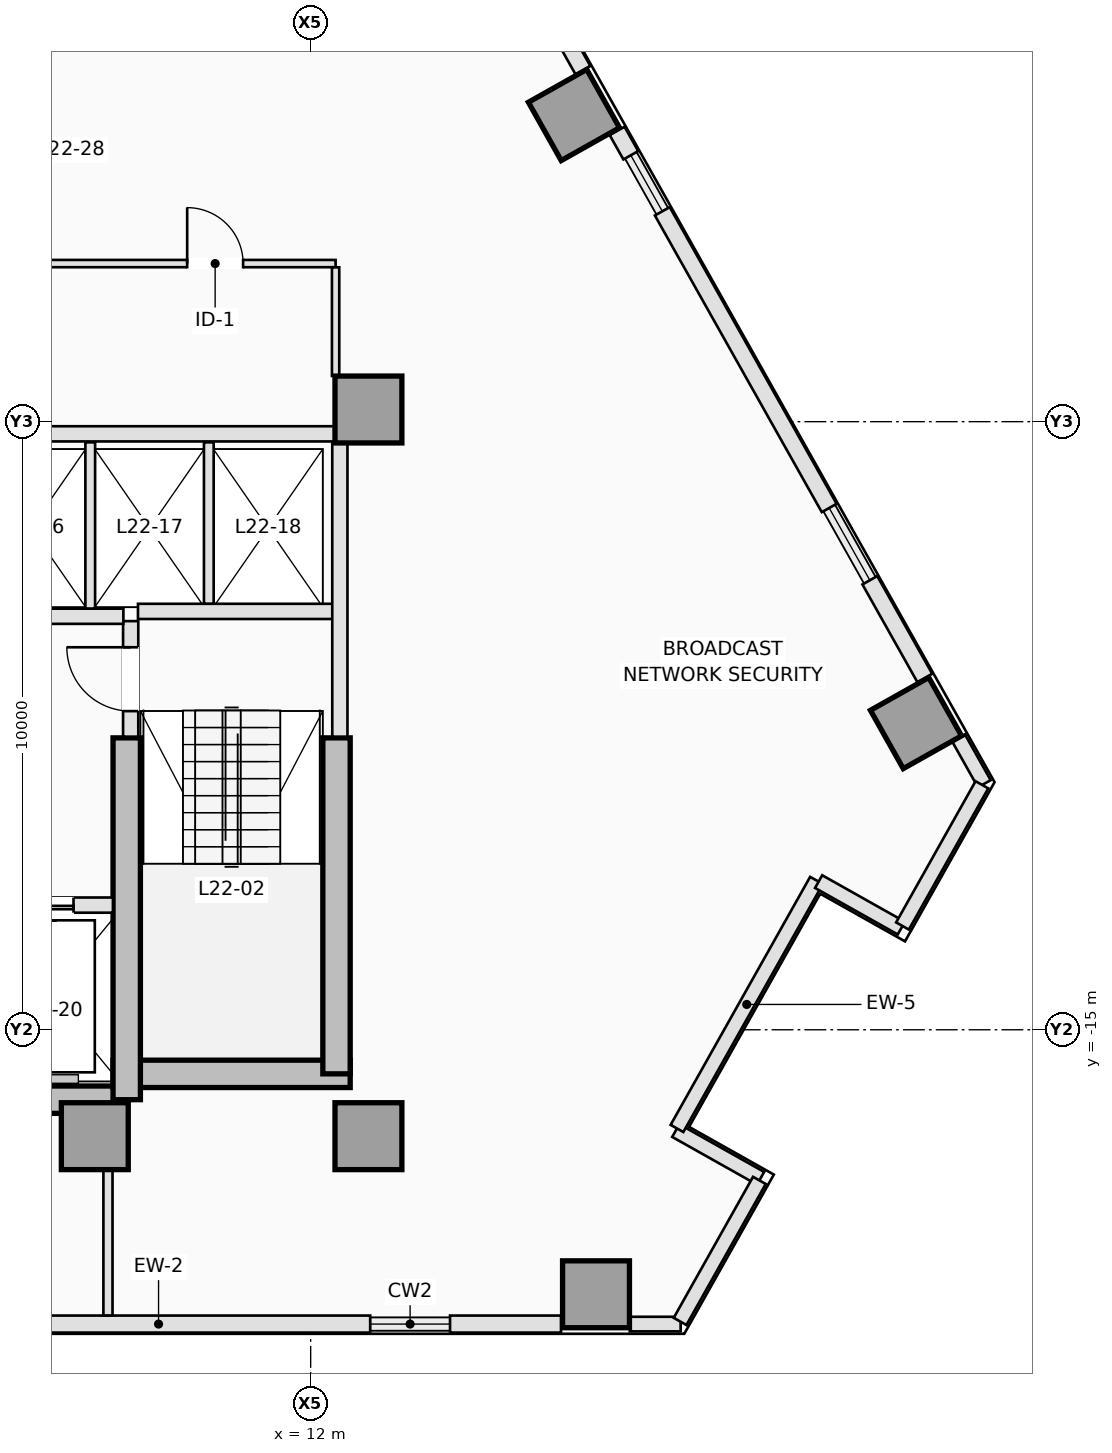
"""IFC4 building model, lengths in metres.
Left out: names, types, materials, properties, quantities, classifications, styles, units other than length and angle.
Written with IfcOpenShell. Run it as: python <this file> out.ifc"""

import sys

from ifc_helpers import new_model, si_unit, direction, frame, frame_2d, origin, origin_2d, place, context, subcontext, project, spatial, rectangle, extrude, element, fill, save


model = new_model("IFC4")
c1 = context("Model", 3, precision=1e-05, world=origin(), true_north=direction((0.0, 1.0)))
c2 = subcontext(c1, "Body", "Model", "MODEL_VIEW")
j1 = project(units=[si_unit("LENGTHUNIT", "METRE"), si_unit("PLANEANGLEUNIT", "RADIAN")], contexts=[c1])
p1 = place(None, origin())
s1 = spatial("IfcSite", under=j1, at=p1, CompositionType="ELEMENT")
p2 = place(p1, origin())
s2 = spatial("IfcBuilding", under=s1, at=p2, CompositionType="ELEMENT")
p3 = place(p2, frame((0.0, 0.0, 83.6)))
s3 = spatial("IfcBuildingStorey", under=s2, at=p3, CompositionType="ELEMENT", Elevation=83.6)
p4 = place(p3, frame((3.75, -16.15, 0.0), z_axis=(0.0, 0.0, 1.0), x_axis=(1.0, 0.0, 0.0)))
e1 = element("IfcWall", 1, at=p4, inside=s3, PredefinedType="SHEAR", context=c2, shape_type="SweptSolid", body=[
    extrude(rectangle(XDim=5.225, YDim=0.45, at=frame_2d((2.613, 0.0))), origin(), (0.0, 0.0, 1.0), 3.5),
])
p5 = place(p3, frame((8.75, -15.725, 0.0), z_axis=(0.0, 0.0, 1.0), x_axis=(1.0, 0.0, 0.0)))
e2 = element("IfcWall", 2, at=p5, inside=s3, PredefinedType="SHEAR", context=c2, shape_type="SweptSolid", body=[
    extrude(rectangle(XDim=3.9, YDim=0.45, at=frame_2d((1.95, 0.0))), origin(), (0.0, 0.0, 1.0), 3.5),
])
p6 = place(p3, frame((12.425, -15.725, 0.0), z_axis=(0.0, 0.0, 1.0), x_axis=(0.0, 1.0, 0.0)))
e3 = element("IfcWall", 3, at=p6, inside=s3, PredefinedType="SHEAR", context=c2, shape_type="SweptSolid", body=[
    extrude(rectangle(XDim=5.525, YDim=0.45, at=frame_2d((2.763, 0.0))), origin(), (0.0, 0.0, 1.0), 3.5),
])
p7 = place(p3, frame((8.975, -16.15, 0.0), z_axis=(0.0, 0.0, 1.0), x_axis=(0.0, 1.0, 0.0)))
e4 = element("IfcWall", 4, at=p7, inside=s3, PredefinedType="SHEAR", context=c2, shape_type="SweptSolid", body=[
    extrude(rectangle(XDim=5.95, YDim=0.45, at=frame_2d((2.975, 0.0))), origin(), (0.0, 0.0, 1.0), 3.5),
])
for number, where, z_axis, x_axis in (
    (5, (8.45, -16.75, 0.0), (0.0, 0.0, 1.0), (1.0, 0.0, 0.0)),
    (6, (12.95, -16.75, 0.0), (0.0, 0.0, 1.0), (1.0, 0.0, 0.0)),
    (7, (12.95, -4.8, 0.0), (0.0, 0.0, 1.0), (1.0, 0.0, 0.0)),
    (8, (16.692, -19.35, 0.0), (0.0, 0.0, 1.0), (0.0, 1.0, 0.0)),
    (9, (21.955, -9.957, 0.0), (0.0, 0.0, 1.0), (0.872, 0.49, 0.0)),
    (10, (16.33, 0.043, 0.0), (0.0, 0.0, 1.0), (0.872, 0.49, 0.0)),
):
    element("IfcColumn", number, at=place(p3, frame(where, z_axis=z_axis, x_axis=x_axis)), inside=s3, PredefinedType="COLUMN", context=c2, shape_type="SweptSolid", body=[
        extrude(rectangle(XDim=1.1, YDim=1.1, at=origin_2d()), origin(), (0.0, 0.0, 1.0), 3.5),
    ])
p8 = place(p3, frame((18.084, -19.84, 0.0), z_axis=(0.0, 0.0, 1.0), x_axis=(-1.0, 0.0, 0.0)))
e11 = element("IfcWall", 11, at=p8, inside=s3, PredefinedType="STANDARD", context=c2, shape_type="SweptSolid", body=[
    extrude(rectangle(XDim=0.836, YDim=0.24, at=frame_2d((0.418, 0.0))), origin(), (0.0, 0.0, 1.0), 3.25),
])
p9 = place(p3, frame((16.117, -19.84, 0.0), z_axis=(0.0, 0.0, 1.0), x_axis=(-1.0, 0.0, 0.0)))
e12 = element("IfcWall", 12, at=p9, inside=s3, PredefinedType="STANDARD", context=c2, shape_type="SweptSolid", body=[
    extrude(rectangle(XDim=1.826, YDim=0.28, at=frame_2d((0.913, 0.0))), origin(), (0.0, 0.0, 1.0), 3.25),
])
p10 = place(p3, frame((12.979, -19.84, 0.0), z_axis=(0.0, 0.0, 1.0), x_axis=(-1.0, 0.0, 0.0)))
e13 = element("IfcWall", 13, at=p10, inside=s3, PredefinedType="STANDARD", context=c2, shape_type="SweptSolid", body=[
    extrude(rectangle(XDim=6.96, YDim=0.28, at=frame_2d((3.48, 0.0))), origin(), (0.0, 0.0, 1.0), 3.25),
])
p11 = place(p3, frame((22.654, -10.2, 0.0), z_axis=(0.0, 0.0, 1.0), x_axis=(0.490355003566, -0.871522788272, 0.0)))
e14 = element("IfcWall", 14, at=p11, inside=s3, PredefinedType="STANDARD", context=c2, shape_type="SweptSolid", body=[
    extrude(rectangle(XDim=0.865, YDim=0.24, at=frame_2d((0.433, 0.0))), origin(), (0.0, 0.0, 1.0), 3.25),
])
p12 = place(p3, frame((17.039, -0.218, 0.0), z_axis=(0.0, 0.0, 1.0), x_axis=(0.490009165718, -0.871717280724, 0.0)))
e15 = element("IfcWall", 15, at=p12, inside=s3, PredefinedType="STANDARD", context=c2, shape_type="SweptSolid", body=[
    extrude(rectangle(XDim=0.46, YDim=0.28, at=frame_2d((0.23, 0.0))), origin(), (0.0, 0.0, 1.0), 3.25),
])
p13 = place(p3, frame((17.783, -1.541, 0.0), z_axis=(0.0, 0.0, 1.0), x_axis=(0.490265381388, -0.871573207374, 0.0)))
e16 = element("IfcWall", 16, at=p13, inside=s3, PredefinedType="STANDARD", context=c2, shape_type="SweptSolid", body=[
    extrude(rectangle(XDim=5.597, YDim=0.28, at=frame_2d((2.799, 0.0))), origin(), (0.0, 0.0, 1.0), 3.25),
])
p14 = place(p3, frame((21.196, -7.608, 0.0), z_axis=(0.0, 0.0, 1.0), x_axis=(0.490280102884, -0.871564926277, 0.0)))
e17 = element("IfcWall", 17, at=p14, inside=s3, PredefinedType="STANDARD", context=c2, shape_type="SweptSolid", body=[
    extrude(rectangle(XDim=1.844, YDim=0.28, at=frame_2d((0.922, 0.0))), origin(), (0.0, 0.0, 1.0), 3.25),
])
p15 = place(p3, frame((14.37, 4.527, 0.0), z_axis=(0.0, 0.0, 1.0), x_axis=(0.490293592365, -0.871557337922, 0.0)))
e18 = element("IfcWall", 18, at=p15, inside=s3, PredefinedType="STANDARD", context=c2, shape_type="SweptSolid", body=[
    extrude(rectangle(XDim=4.299, YDim=0.28, at=frame_2d((2.15, 0.0))), origin(), (0.0, 0.0, 1.0), 3.25),
])
p16 = place(p3, frame((19.399, -17.442, 0.0), z_axis=(0.0, 0.0, 1.0), x_axis=(-0.871575537125, 0.490261239633, 0.0)))
e19 = element("IfcWall", 19, at=p16, inside=s3, PredefinedType="STANDARD", context=c2, shape_type="SweptSolid", body=[
    extrude(rectangle(XDim=1.6, YDim=0.24, at=frame_2d((0.8, 0.0))), origin(), (0.0, 0.0, 1.0), 3.25),
])
p17 = place(p3, frame((18.024, -16.623, 0.0), z_axis=(0.0, 0.0, 1.0), x_axis=(0.490273623647, 0.871568571001, 0.0)))
e20 = element("IfcWall", 20, at=p17, inside=s3, PredefinedType="STANDARD", context=c2, shape_type="SweptSolid", body=[
    extrude(rectangle(XDim=4.68, YDim=0.24, at=frame_2d((2.34, 0.0))), origin(), (0.0, 0.0, 1.0), 2.722),
])
p18 = place(p3, frame((20.354, -12.564, 0.0), z_axis=(0.0, 0.0, 1.0), x_axis=(0.871546278971, -0.490313250496, 0.0)))
e21 = element("IfcWall", 21, at=p18, inside=s3, PredefinedType="STANDARD", context=c2, shape_type="SweptSolid", body=[
    extrude(rectangle(XDim=1.56, YDim=0.24, at=frame_2d((0.78, 0.0))), origin(), (0.0, 0.0, 1.0), 3.25),
])
p19 = place(p3, frame((21.733, -13.294, 0.0), z_axis=(0.0, 0.0, 1.0), x_axis=(0.490265590412, 0.871573089797, 0.0)))
e22 = element("IfcWall", 22, at=p19, inside=s3, PredefinedType="STANDARD", context=c2, shape_type="SweptSolid", body=[
    extrude(rectangle(XDim=2.664, YDim=0.24, at=frame_2d((1.332, 0.0))), origin(), (0.0, 0.0, 1.0), 3.25),
])
p20 = place(p3, frame((18.075, -19.796, 0.0), z_axis=(0.0, 0.0, 1.0), x_axis=(0.490248170584, 0.871582888335, 0.0)))
e23 = element("IfcWall", 23, at=p20, inside=s3, PredefinedType="STANDARD", context=c2, shape_type="SweptSolid", body=[
    extrude(rectangle(XDim=2.661, YDim=0.24, at=frame_2d((1.331, 0.0))), origin(), (0.0, 0.0, 1.0), 3.25),
])
p21 = place(p3, frame((9.04, -10.18, 0.0), z_axis=(0.0, 0.0, 1.0), x_axis=(0.0, 1.0, 0.0)))
e24 = element("IfcWall", 24, at=p21, inside=s3, PredefinedType="PARTITIONING", context=c2, shape_type="SweptSolid", body=[
    extrude(rectangle(XDim=1.9, YDim=0.25, at=frame_2d((0.95, 0.0))), origin(), (0.0, 0.0, 1.0), 3.25),
])
p22 = place(p21, frame((0.42, 0.0, 0.0)))
e25 = element("IfcOpeningElement", 25, at=p22, cuts=e24, PredefinedType="OPENING", context=c2, shape_type="SweptSolid", body=[
    extrude(rectangle(XDim=1.05, YDim=2.15, at=frame_2d((0.525, 1.075))), frame((0.0, 0.135, 0.0), z_axis=(0.0, -1.0, 0.0), x_axis=(1.0, 0.0, 0.0)), (0.0, 0.0, 1.0), 0.27),
])
p23 = place(p3, frame((9.16, -8.12, 0.0), z_axis=(0.0, 0.0, 1.0), x_axis=(1.0, 0.0, 0.0)))
e26 = element("IfcWall", 26, at=p23, inside=s3, PredefinedType="PARTITIONING", context=c2, shape_type="SweptSolid", body=[
    extrude(rectangle(XDim=3.22, YDim=0.25, at=frame_2d((1.61, 0.0))), origin(), (0.0, 0.0, 1.0), 3.25),
])
p24 = place(p3, frame((12.48, -10.18, 0.0), z_axis=(0.0, 0.0, 1.0), x_axis=(0.0, 1.0, 0.0)))
e27 = element("IfcWall", 27, at=p24, inside=s3, PredefinedType="PARTITIONING", context=c2, shape_type="SweptSolid", body=[
    extrude(rectangle(XDim=4.828, YDim=0.25, at=frame_2d((2.414, 0.0))), origin(), (0.0, 0.0, 1.0), 3.25),
])
p25 = place(p3, frame((3.68, -12.95, 0.0), z_axis=(0.0, 0.0, 1.0), x_axis=(1.0, 0.0, 0.0)))
e28 = element("IfcWall", 28, at=p25, inside=s3, PredefinedType="PARTITIONING", context=c2, shape_type="SweptSolid", body=[
    extrude(rectangle(XDim=5.068, YDim=0.25, at=frame_2d((2.534, 0.0))), origin(), (0.0, 0.0, 1.0), 3.25),
])
p26 = place(p25, frame((3.32, 0.0, 0.0)))
e29 = element("IfcOpeningElement", 29, at=p26, cuts=e28, PredefinedType="OPENING", context=c2, shape_type="SweptSolid", body=[
    extrude(rectangle(XDim=1.1, YDim=2.15, at=frame_2d((0.55, 1.075))), frame((0.0, 0.135, 0.0), z_axis=(0.0, -1.0, 0.0), x_axis=(1.0, 0.0, 0.0)), (0.0, 0.0, 1.0), 0.27),
])
p27 = place(p25, frame((0.67, 0.0, 0.0)))
e30 = element("IfcOpeningElement", 30, at=p27, cuts=e28, PredefinedType="OPENING", context=c2, shape_type="SweptSolid", body=[
    extrude(rectangle(XDim=1.2, YDim=2.15, at=frame_2d((0.6, 1.075))), frame((0.0, 0.135, 0.0), z_axis=(0.0, -1.0, 0.0), x_axis=(1.0, 0.0, 0.0)), (0.0, 0.0, 1.0), 0.27),
])
p28 = place(p3, frame((3.68, -8.2, 0.0), z_axis=(0.0, 0.0, 1.0), x_axis=(1.0, 0.0, 0.0)))
e31 = element("IfcWall", 31, at=p28, inside=s3, PredefinedType="PARTITIONING", context=c2, shape_type="SweptSolid", body=[
    extrude(rectangle(XDim=5.24, YDim=0.25, at=frame_2d((2.62, 0.0))), origin(), (0.0, 0.0, 1.0), 3.25),
])
p29 = place(p3, frame((4.302, -5.2, 0.0), z_axis=(0.0, 0.0, 1.0), x_axis=(1.0, 0.0, 0.0)))
e32 = element("IfcWall", 32, at=p29, inside=s3, PredefinedType="PARTITIONING", context=c2, shape_type="SweptSolid", body=[
    extrude(rectangle(XDim=8.096, YDim=0.25, at=frame_2d((4.048, 0.0))), origin(), (0.0, 0.0, 1.0), 3.25),
])
p30 = place(p3, frame((8.375, -8.073, 0.0), z_axis=(0.0, 0.0, 1.0), x_axis=(0.0, 1.0, 0.0)))
e33 = element("IfcWall", 33, at=p30, inside=s3, PredefinedType="PARTITIONING", context=c2, shape_type="SweptSolid", body=[
    extrude(rectangle(XDim=2.733, YDim=0.16, at=frame_2d((1.366, 0.0))), origin(), (0.0, 0.0, 1.0), 3.25),
])
p31 = place(p3, frame((10.325, -7.993, 0.0), z_axis=(0.0, 0.0, 1.0), x_axis=(0.0, 1.0, 0.0)))
e34 = element("IfcWall", 34, at=p31, inside=s3, PredefinedType="PARTITIONING", context=c2, shape_type="SweptSolid", body=[
    extrude(rectangle(XDim=2.653, YDim=0.16, at=frame_2d((1.326, 0.0))), origin(), (0.0, 0.0, 1.0), 3.25),
])
p32 = place(p3, frame((6.562, -2.4, 0.0), z_axis=(0.0, 0.0, 1.0), x_axis=(1.0, 0.0, 0.0)))
e35 = element("IfcWall", 35, at=p32, inside=s3, PredefinedType="PARTITIONING", context=c2, shape_type="SweptSolid", body=[
    extrude(rectangle(XDim=5.848, YDim=0.12, at=frame_2d((2.924, 0.0))), origin(), (0.0, 0.0, 1.0), 3.25),
])
p33 = place(p32, frame((3.407, 0.0, 0.0)))
e36 = element("IfcOpeningElement", 36, at=p33, cuts=e35, PredefinedType="OPENING", context=c2, shape_type="SweptSolid", body=[
    extrude(rectangle(XDim=0.92, YDim=2.12, at=frame_2d((0.46, 1.06))), frame((0.0, 0.07, 0.0), z_axis=(0.0, -1.0, 0.0), x_axis=(1.0, 0.0, 0.0)), (0.0, 0.0, 1.0), 0.14),
])
p34 = place(p3, frame((12.41, -2.462, 0.0), z_axis=(0.0, 0.0, 1.0), x_axis=(0.0, -1.0, 0.0)))
e37 = element("IfcWall", 37, at=p34, inside=s3, PredefinedType="PARTITIONING", context=c2, shape_type="SweptSolid", body=[
    extrude(rectangle(XDim=1.786, YDim=0.12, at=frame_2d((0.893, 0.0))), origin(), (0.0, 0.0, 1.0), 3.25),
])
p35 = place(p3, frame((8.667, -19.698, 0.0), z_axis=(0.0, 0.0, 1.0), x_axis=(0.0, 1.0, 0.0)))
e38 = element("IfcWall", 38, at=p35, inside=s3, PredefinedType="PARTITIONING", context=c2, shape_type="SweptSolid", body=[
    extrude(rectangle(XDim=2.396, YDim=0.15, at=frame_2d((1.198, 0.0))), origin(), (0.0, 0.0, 1.0), 3.25),
])
p36 = place(p26, origin())
e39 = element("IfcDoor", 39, at=p36, inside=s3, OperationType="SLIDING_TO_RIGHT", PredefinedType="DOOR", context=c2, shape_type="SweptSolid", body=[
    extrude(rectangle(XDim=1.1, YDim=2.15, at=frame_2d((0.55, 1.075))), frame((0.0, 0.025, 0.0), z_axis=(0.0, -1.0, 0.0), x_axis=(1.0, 0.0, 0.0)), (0.0, 0.0, 1.0), 0.05),
])
fill(e29, e39)
p37 = place(p22, origin())
e40 = element("IfcDoor", 40, at=p37, inside=s3, OperationType="SINGLE_SWING_RIGHT", PredefinedType="DOOR", context=c2, shape_type="SweptSolid", body=[
    extrude(rectangle(XDim=1.05, YDim=2.15, at=frame_2d((0.525, 1.075))), frame((0.0, 0.025, 0.0), z_axis=(0.0, -1.0, 0.0), x_axis=(1.0, 0.0, 0.0)), (0.0, 0.0, 1.0), 0.05),
])
fill(e25, e40)
p38 = place(p33, origin())
e41 = element("IfcDoor", 41, at=p38, inside=s3, OperationType="SINGLE_SWING_LEFT", PredefinedType="DOOR", context=c2, shape_type="SweptSolid", body=[
    extrude(rectangle(XDim=0.92, YDim=2.12, at=frame_2d((0.46, 1.06))), frame((0.0, 0.025, 0.0), z_axis=(0.0, -1.0, 0.0), x_axis=(1.0, 0.0, 0.0)), (0.0, 0.0, 1.0), 0.05),
])
fill(e36, e41)
save(model, sys.argv[1])
